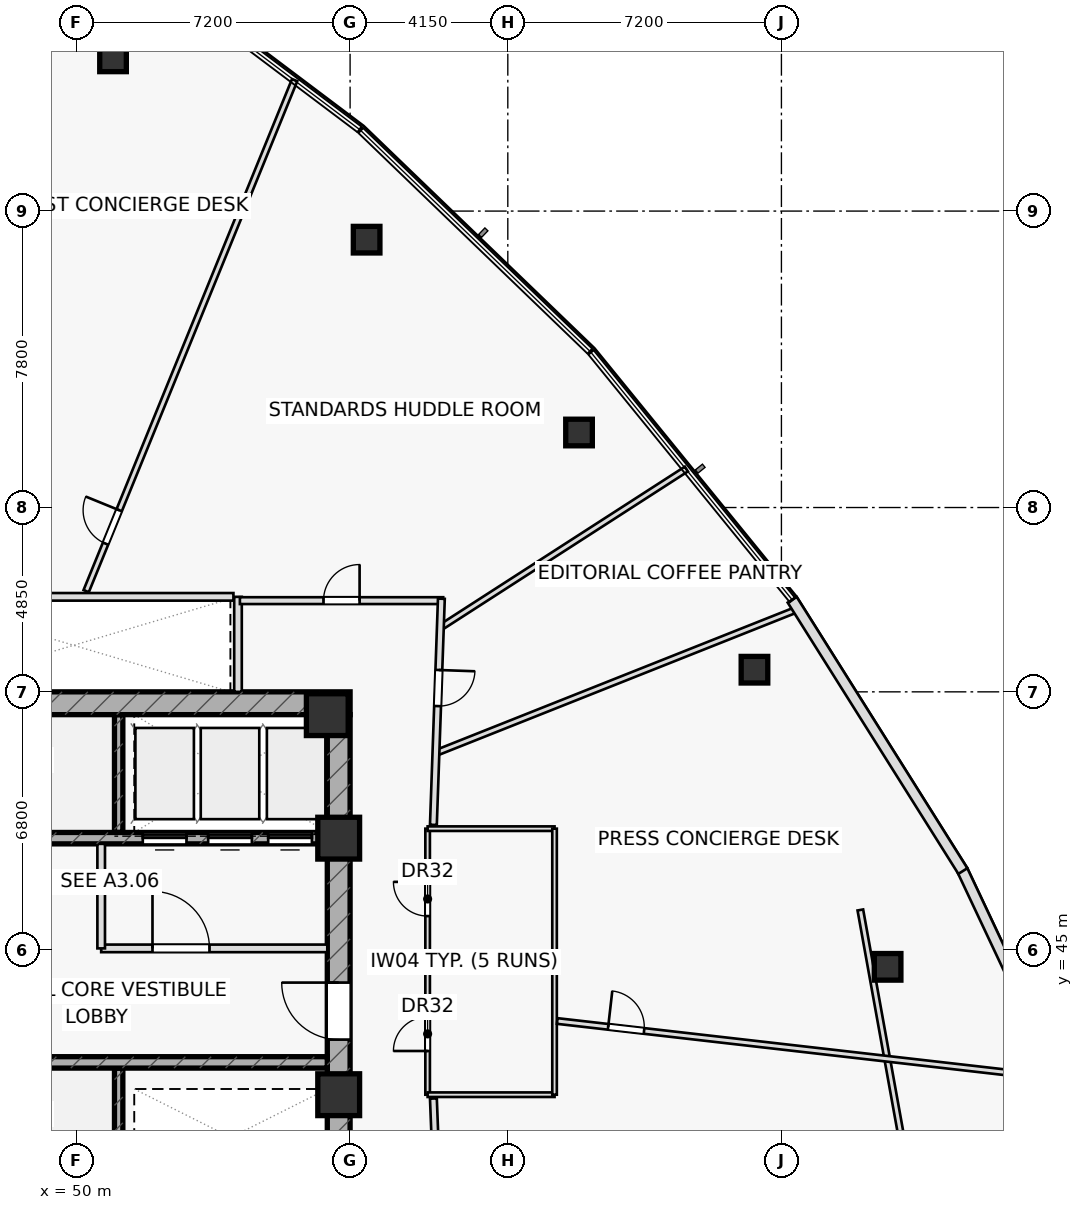
"""IFC4 building model, lengths in metres.
Left out: names, types, materials, properties, quantities, classifications, styles, units other than length and angle.
Written with IfcOpenShell. Run it as: python <this file> out.ifc"""

import sys

from ifc_helpers import new_model, si_unit, direction, frame, frame_2d, origin, origin_2d, place, context, subcontext, project, spatial, rectangle, hollow_rectangle, extrude, element, fill, save


model = new_model("IFC4")
c1 = context("Model", 3, precision=1e-05, world=origin(), true_north=direction((0.0, 1.0)))
c2 = subcontext(c1, "Body", "Model", "MODEL_VIEW")
j1 = project(units=[si_unit("LENGTHUNIT", "METRE"), si_unit("PLANEANGLEUNIT", "RADIAN")], contexts=[c1])
p1 = place(None, origin())
s1 = spatial("IfcSite", under=j1, at=p1, CompositionType="ELEMENT")
p2 = place(p1, origin())
s2 = spatial("IfcBuilding", under=s1, at=p2, CompositionType="ELEMENT")
p3 = place(p2, frame((0.0, 0.0, 78.3)))
s3 = spatial("IfcBuildingStorey", under=s2, at=p3, CompositionType="ELEMENT", Elevation=78.3)
for number, where, z_axis, x_axis in (
    (1, (51.11, 48.1, 0.0), (0.0, 0.0, 1.0), (0.0, 1.0, 0.0)),
    (2, (51.11, 38.8, 0.0), (0.0, 0.0, 1.0), (0.0, 1.0, 0.0)),
):
    element("IfcWall", number, at=place(p3, frame(where, z_axis=z_axis, x_axis=x_axis)), inside=s3, PredefinedType="SHEAR", context=c2, shape_type="SweptSolid", body=[
        extrude(rectangle(XDim=3.1, YDim=0.22, at=frame_2d((1.55, 0.0))), origin(), (0.0, 0.0, 1.0), 3.6),
    ])
p4 = place(p3, frame((42.8, 51.5, 0.0), z_axis=(0.0, 0.0, 1.0), x_axis=(1.0, 0.0, 0.0)))
e3 = element("IfcWall", 3, at=p4, inside=s3, PredefinedType="SHEAR", context=c2, shape_type="SweptSolid", body=[
    extrude(rectangle(XDim=14.4, YDim=0.6, at=frame_2d((7.2, 0.0))), origin(), (0.0, 0.0, 1.0), 3.6),
])
p5 = place(p4, frame((0.88, 0.0, 0.0)))
e4 = element("IfcOpeningElement", 4, at=p5, cuts=e3, PredefinedType="OPENING", context=c2, shape_type="SweptSolid", body=[
    extrude(rectangle(XDim=1.05, YDim=2.2, at=frame_2d((0.525, 1.1))), frame((0.0, 0.31, 0.0), z_axis=(0.0, -1.0, 0.0), x_axis=(1.0, 0.0, 0.0)), (0.0, 0.0, 1.0), 0.62),
])
p6 = place(p3, frame((56.9, 38.8, 0.0), z_axis=(0.0, 0.0, 1.0), x_axis=(0.0, 1.0, 0.0)))
e5 = element("IfcWall", 5, at=p6, inside=s3, PredefinedType="SHEAR", context=c2, shape_type="SweptSolid", body=[
    extrude(rectangle(XDim=12.4, YDim=0.6, at=frame_2d((6.2, 0.0))), origin(), (0.0, 0.0, 1.0), 3.6),
])
p7 = place(p6, frame((3.85, 0.0, 0.0)))
e6 = element("IfcOpeningElement", 6, at=p7, cuts=e5, PredefinedType="OPENING", context=c2, shape_type="SweptSolid", body=[
    extrude(rectangle(XDim=1.5, YDim=2.2, at=frame_2d((0.75, 1.1))), frame((0.0, 0.31, 0.0), z_axis=(0.0, -1.0, 0.0), x_axis=(1.0, 0.0, 0.0)), (0.0, 0.0, 1.0), 0.62),
])
p8 = place(p3, frame((43.4, 47.95, 0.0), z_axis=(0.0, 0.0, 1.0), x_axis=(1.0, 0.0, 0.0)))
e7 = element("IfcWall", 7, at=p8, inside=s3, PredefinedType="SHEAR", context=c2, shape_type="SweptSolid", body=[
    extrude(rectangle(XDim=13.2, YDim=0.3, at=frame_2d((6.6, 0.0))), origin(), (0.0, 0.0, 1.0), 3.6),
])
p9 = place(p8, frame((8.345, 0.0, 0.0)))
e8 = element("IfcOpeningElement", 8, at=p9, cuts=e7, PredefinedType="OPENING", context=c2, shape_type="SweptSolid", body=[
    extrude(rectangle(XDim=1.15, YDim=2.2, at=frame_2d((0.575, 1.1))), frame((0.0, 0.16, 0.0), z_axis=(0.0, -1.0, 0.0), x_axis=(1.0, 0.0, 0.0)), (0.0, 0.0, 1.0), 0.32),
])
p10 = place(p8, frame((10.065, 0.0, 0.0)))
e9 = element("IfcOpeningElement", 9, at=p10, cuts=e7, PredefinedType="OPENING", context=c2, shape_type="SweptSolid", body=[
    extrude(rectangle(XDim=1.15, YDim=2.2, at=frame_2d((0.575, 1.1))), frame((0.0, 0.16, 0.0), z_axis=(0.0, -1.0, 0.0), x_axis=(1.0, 0.0, 0.0)), (0.0, 0.0, 1.0), 0.32),
])
p11 = place(p8, frame((11.645, 0.0, 0.0)))
e10 = element("IfcOpeningElement", 10, at=p11, cuts=e7, PredefinedType="OPENING", context=c2, shape_type="SweptSolid", body=[
    extrude(rectangle(XDim=1.15, YDim=2.2, at=frame_2d((0.575, 1.1))), frame((0.0, 0.16, 0.0), z_axis=(0.0, -1.0, 0.0), x_axis=(1.0, 0.0, 0.0)), (0.0, 0.0, 1.0), 0.32),
])
p12 = place(p3, frame((43.4, 42.05, 0.0), z_axis=(0.0, 0.0, 1.0), x_axis=(1.0, 0.0, 0.0)))
e11 = element("IfcWall", 11, at=p12, inside=s3, PredefinedType="SHEAR", context=c2, shape_type="SweptSolid", body=[
    extrude(rectangle(XDim=13.2, YDim=0.3, at=frame_2d((6.6, 0.0))), origin(), (0.0, 0.0, 1.0), 3.6),
])
for number, where, z_axis, x_axis in (
    (12, (56.9, 47.95, 0.0), (0.0, 0.0, 1.0), (1.0, 0.0, 0.0)),
    (13, (56.6, 51.2, 0.0), (0.0, 0.0, 1.0), (1.0, 0.0, 0.0)),
    (14, (56.9, 41.2, 0.0), (0.0, 0.0, 1.0), (1.0, 0.0, 0.0)),
):
    element("IfcColumn", number, at=place(p3, frame(where, z_axis=z_axis, x_axis=x_axis)), inside=s3, PredefinedType="COLUMN", context=c2, shape_type="SweptSolid", body=[
        extrude(rectangle(XDim=1.1, YDim=1.1, at=origin_2d()), origin(), (0.0, 0.0, 1.0), 3.6),
    ])
for number, where, z_axis, x_axis in (
    (15, (71.344, 44.565, 0.0), (0.0, 0.0, 1.0), (1.0, 0.0, 0.0)),
    (16, (67.841, 52.383, 0.0), (0.0, 0.0, 1.0), (1.0, 0.0, 0.0)),
    (17, (63.224, 58.624, 0.0), (0.0, 0.0, 1.0), (1.0, 0.0, 0.0)),
    (18, (57.635, 63.698, 0.0), (0.0, 0.0, 1.0), (1.0, 0.0, 0.0)),
    (19, (50.962, 68.469, 0.0), (0.0, 0.0, 1.0), (1.0, 0.0, 0.0)),
):
    element("IfcColumn", number, at=place(p3, frame(where, z_axis=z_axis, x_axis=x_axis)), inside=s3, PredefinedType="COLUMN", context=c2, shape_type="SweptSolid", body=[
        extrude(hollow_rectangle(XDim=0.7, YDim=0.7, WallThickness=0.04, at=origin_2d()), origin(), (0.0, 0.0, 1.0), 3.6),
    ])
p13 = place(p3, frame((54.25, 51.8, 0.0), z_axis=(0.0, 0.0, 1.0), x_axis=(0.0, 1.0, 0.0)))
e20 = element("IfcWall", 20, at=p13, inside=s3, PredefinedType="PARTITIONING", context=c2, shape_type="SweptSolid", body=[
    extrude(rectangle(XDim=2.5, YDim=0.2, at=frame_2d((1.25, 0.0))), origin(), (0.0, 0.0, 1.0), 3.6),
])
p14 = place(p3, frame((50.65, 45.05, 0.0), z_axis=(0.0, 0.0, 1.0), x_axis=(1.0, 0.0, 0.0)))
e21 = element("IfcWall", 21, at=p14, inside=s3, PredefinedType="PARTITIONING", context=c2, shape_type="SweptSolid", body=[
    extrude(rectangle(XDim=5.95, YDim=0.2, at=frame_2d((2.975, 0.0))), origin(), (0.0, 0.0, 1.0), 3.6),
])
p15 = place(p14, frame((1.35, 0.0, 0.0)))
e22 = element("IfcOpeningElement", 22, at=p15, cuts=e21, PredefinedType="OPENING", context=c2, shape_type="SweptSolid", body=[
    extrude(rectangle(XDim=1.5, YDim=2.2, at=frame_2d((0.75, 1.1))), frame((0.0, 0.11, 0.0), z_axis=(0.0, -1.0, 0.0), x_axis=(1.0, 0.0, 0.0)), (0.0, 0.0, 1.0), 0.22),
])
p16 = place(p3, frame((50.65, 45.05, 0.0), z_axis=(0.0, 0.0, 1.0), x_axis=(0.0, 1.0, 0.0)))
e23 = element("IfcWall", 23, at=p16, inside=s3, PredefinedType="PARTITIONING", context=c2, shape_type="SweptSolid", body=[
    extrude(rectangle(XDim=2.75, YDim=0.2, at=frame_2d((1.375, 0.0))), origin(), (0.0, 0.0, 1.0), 3.6),
])
p17 = place(p3, frame((72.969, 33.091, 0.0), z_axis=(0.0, 0.0, 1.0), x_axis=(-0.177742578179, 0.984077017261, 0.0)))
e24 = element("IfcWall", 24, at=p17, inside=s3, PredefinedType="PARTITIONING", context=c2, shape_type="SweptSolid", body=[
    extrude(rectangle(XDim=13.179, YDim=0.15, at=frame_2d((6.59, 0.0))), origin(), (0.0, 0.0, 1.0), 2.975),
])
p18 = place(p3, frame((59.24, 41.2, 0.0), z_axis=(0.0, 0.0, 1.0), x_axis=(0.0, 1.0, 0.0)))
e25 = element("IfcWall", 25, at=p18, inside=s3, PredefinedType="PARTITIONING", context=c2, shape_type="SweptSolid", body=[
    extrude(rectangle(XDim=7.0, YDim=0.12, at=frame_2d((3.5, 0.0))), origin(), (0.0, 0.0, 1.0), 3.6),
])
p19 = place(p18, frame((1.15, 0.0, 0.0)))
e26 = element("IfcOpeningElement", 26, at=p19, cuts=e25, PredefinedType="OPENING", context=c2, shape_type="SweptSolid", body=[
    extrude(rectangle(XDim=0.9, YDim=2.05, at=frame_2d((0.45, 1.025))), frame((0.0, 0.07, 0.0), z_axis=(0.0, -1.0, 0.0), x_axis=(1.0, 0.0, 0.0)), (0.0, 0.0, 1.0), 0.14),
])
p20 = place(p18, frame((4.7, 0.0, 0.0)))
e27 = element("IfcOpeningElement", 27, at=p20, cuts=e25, PredefinedType="OPENING", context=c2, shape_type="SweptSolid", body=[
    extrude(rectangle(XDim=0.9, YDim=2.05, at=frame_2d((0.45, 1.025))), frame((0.0, 0.07, 0.0), z_axis=(0.0, -1.0, 0.0), x_axis=(1.0, 0.0, 0.0)), (0.0, 0.0, 1.0), 0.14),
])
p21 = place(p3, frame((59.24, 41.2, 0.0), z_axis=(0.0, 0.0, 1.0), x_axis=(1.0, 0.0, 0.0)))
e28 = element("IfcWall", 28, at=p21, inside=s3, PredefinedType="PARTITIONING", context=c2, shape_type="SweptSolid", body=[
    extrude(rectangle(XDim=3.34, YDim=0.12, at=frame_2d((1.67, 0.0))), origin(), (0.0, 0.0, 1.0), 2.975),
])
for number, where, z_axis, x_axis in (
    (29, (59.24, 44.65, 0.0), (0.0, 0.0, 1.0), (1.0, 0.0, 0.0)),
    (30, (59.24, 48.2, 0.0), (0.0, 0.0, 1.0), (1.0, 0.0, 0.0)),
):
    element("IfcWall", number, at=place(p3, frame(where, z_axis=z_axis, x_axis=x_axis)), inside=s3, PredefinedType="PARTITIONING", context=c2, shape_type="SweptSolid", body=[
        extrude(rectangle(XDim=3.34, YDim=0.12, at=frame_2d((1.67, 0.0))), origin(), (0.0, 0.0, 1.0), 3.6),
    ])
p22 = place(p3, frame((62.58, 41.2, 0.0), z_axis=(0.0, 0.0, 1.0), x_axis=(0.0, 1.0, 0.0)))
e31 = element("IfcWall", 31, at=p22, inside=s3, PredefinedType="PARTITIONING", context=c2, shape_type="SweptSolid", body=[
    extrude(rectangle(XDim=7.0, YDim=0.12, at=frame_2d((3.5, 0.0))), origin(), (0.0, 0.0, 1.0), 3.6),
])
p23 = place(p3, frame((62.65, 43.139, 0.0), z_axis=(0.0, 0.0, 1.0), x_axis=(0.993507762736, -0.113764341437, 0.0)))
e32 = element("IfcWall", 32, at=p23, inside=s3, PredefinedType="PARTITIONING", context=c2, shape_type="SweptSolid", body=[
    extrude(rectangle(XDim=13.344, YDim=0.15, at=frame_2d((6.672, 0.0))), origin(), (0.0, 0.0, 1.0), 2.975),
])
p24 = place(p23, frame((1.35, 0.0, 0.0)))
e33 = element("IfcOpeningElement", 33, at=p24, cuts=e32, PredefinedType="OPENING", context=c2, shape_type="SweptSolid", body=[
    extrude(rectangle(XDim=0.95, YDim=2.05, at=frame_2d((0.475, 1.025))), frame((0.0, 0.085, 0.0), z_axis=(0.0, -1.0, 0.0), x_axis=(1.0, 0.0, 0.0)), (0.0, 0.0, 1.0), 0.17),
])
p25 = place(p3, frame((59.458, 50.191, 0.0), z_axis=(0.0, 0.0, 1.0), x_axis=(0.929263627869, 0.369417257204, 0.0)))
e34 = element("IfcWall", 34, at=p25, inside=s3, PredefinedType="PARTITIONING", context=c2, shape_type="SweptSolid", body=[
    extrude(rectangle(XDim=10.264, YDim=0.15, at=frame_2d((5.132, 0.0))), origin(), (0.0, 0.0, 1.0), 2.975),
])
p26 = place(p3, frame((59.575, 53.49, 0.0), z_axis=(0.0, 0.0, 1.0), x_axis=(0.840572318157, 0.541699342762, 0.0)))
e35 = element("IfcWall", 35, at=p26, inside=s3, PredefinedType="PARTITIONING", context=c2, shape_type="SweptSolid", body=[
    extrude(rectangle(XDim=7.701, YDim=0.15, at=frame_2d((3.851, 0.0))), origin(), (0.0, 0.0, 1.0), 3.025),
])
p27 = place(p3, frame((50.255, 54.45, 0.0), z_axis=(0.0, 0.0, 1.0), x_axis=(0.377744353623, 0.92590993261, 0.0)))
e36 = element("IfcWall", 36, at=p27, inside=s3, PredefinedType="PARTITIONING", context=c2, shape_type="SweptSolid", body=[
    extrude(rectangle(XDim=14.522, YDim=0.15, at=frame_2d((7.261, 0.0))), origin(), (0.0, 0.0, 1.0), 2.975),
])
p28 = place(p27, frame((1.35, 0.0, 0.0)))
e37 = element("IfcOpeningElement", 37, at=p28, cuts=e36, PredefinedType="OPENING", context=c2, shape_type="SweptSolid", body=[
    extrude(rectangle(XDim=0.95, YDim=2.05, at=frame_2d((0.475, 1.025))), frame((0.0, 0.085, 0.0), z_axis=(0.0, -1.0, 0.0), x_axis=(1.0, 0.0, 0.0)), (0.0, 0.0, 1.0), 0.17),
])
p29 = place(p3, frame((54.3, 54.2, 0.0), z_axis=(0.0, 0.0, 1.0), x_axis=(1.0, 0.0, 0.0)))
e38 = element("IfcWall", 38, at=p29, inside=s3, PredefinedType="PARTITIONING", context=c2, shape_type="SweptSolid", body=[
    extrude(rectangle(XDim=5.35, YDim=0.18, at=frame_2d((2.675, 0.0))), origin(), (0.0, 0.0, 1.0), 2.975),
])
p30 = place(p29, frame((2.2, 0.0, 0.0)))
e39 = element("IfcOpeningElement", 39, at=p30, cuts=e38, PredefinedType="OPENING", context=c2, shape_type="SweptSolid", body=[
    extrude(rectangle(XDim=0.95, YDim=2.05, at=frame_2d((0.475, 1.025))), frame((0.0, 0.1, 0.0), z_axis=(0.0, -1.0, 0.0), x_axis=(1.0, 0.0, 0.0)), (0.0, 0.0, 1.0), 0.2),
])
p31 = place(p3, frame((59.602, 54.25, 0.0), z_axis=(0.0, 0.0, 1.0), x_axis=(-0.035265891834, -0.999377964973, 0.0)))
e40 = element("IfcWall", 40, at=p31, inside=s3, PredefinedType="PARTITIONING", context=c2, shape_type="SweptSolid", body=[
    extrude(rectangle(XDim=5.954, YDim=0.18, at=frame_2d((2.977, 0.0))), origin(), (0.0, 0.0, 1.0), 2.975),
])
p32 = place(p31, frame((1.876, 0.0, 0.0)))
e41 = element("IfcOpeningElement", 41, at=p32, cuts=e40, PredefinedType="OPENING", context=c2, shape_type="SweptSolid", body=[
    extrude(rectangle(XDim=0.95, YDim=2.05, at=frame_2d((0.475, 1.025))), frame((0.0, 0.1, 0.0), z_axis=(0.0, -1.0, 0.0), x_axis=(1.0, 0.0, 0.0)), (0.0, 0.0, 1.0), 0.2),
])
p33 = place(p3, frame((59.392, 41.1, 0.0), z_axis=(0.0, 0.0, 1.0), x_axis=(0.03921413315, -0.999230830069, 0.0)))
e42 = element("IfcWall", 42, at=p33, inside=s3, PredefinedType="PARTITIONING", context=c2, shape_type="SweptSolid", body=[
    extrude(rectangle(XDim=5.354, YDim=0.18, at=frame_2d((2.677, 0.0))), origin(), (0.0, 0.0, 1.0), 2.975),
])
p34 = place(p33, frame((2.202, 0.0, 0.0)))
e43 = element("IfcOpeningElement", 43, at=p34, cuts=e42, PredefinedType="OPENING", context=c2, shape_type="SweptSolid", body=[
    extrude(rectangle(XDim=0.95, YDim=2.05, at=frame_2d((0.475, 1.025))), frame((0.0, 0.1, 0.0), z_axis=(0.0, -1.0, 0.0), x_axis=(1.0, 0.0, 0.0)), (0.0, 0.0, 1.0), 0.2),
])
p35 = place(p3, frame((76.909, 39.471, 0.0), z_axis=(0.0, 0.0, 1.0), x_axis=(-0.426150605753, 0.904652232196, 0.0)))
e44 = element("IfcWall", 44, at=p35, inside=s3, PredefinedType="STANDARD", context=c2, shape_type="SweptSolid", body=[
    extrude(rectangle(XDim=8.446, YDim=0.28, at=frame_2d((4.223, 0.0))), origin(), (0.0, 0.0, 1.0), 3.6),
])
p36 = place(p3, frame((73.324, 47.085, 0.0), z_axis=(0.0, 0.0, 1.0), x_axis=(-0.53250765481, 0.846425187225, 0.0)))
e45 = element("IfcWall", 45, at=p36, inside=s3, PredefinedType="STANDARD", context=c2, shape_type="SweptSolid", body=[
    extrude(rectangle(XDim=8.434, YDim=0.28, at=frame_2d((4.217, 0.0))), origin(), (0.0, 0.0, 1.0), 3.6),
])
p37 = place(p3, frame((45.82, 54.3, 0.0), z_axis=(0.0, 0.0, 1.0), x_axis=(1.0, 0.0, 0.0)))
e46 = element("IfcWall", 46, at=p37, inside=s3, PredefinedType="PARTITIONING", context=c2, shape_type="SweptSolid", body=[
    extrude(rectangle(XDim=8.31, YDim=0.2, at=frame_2d((4.155, 0.0))), origin(), (0.0, 0.0, 1.0), 3.6),
])
p38 = place(p7, origin())
e47 = element("IfcDoor", 47, at=p38, inside=s3, OperationType="SINGLE_SWING_RIGHT", PredefinedType="DOOR", context=c2, shape_type="SweptSolid", body=[
    extrude(rectangle(XDim=1.5, YDim=2.2, at=frame_2d((0.75, 1.1))), frame((0.0, 0.025, 0.0), z_axis=(0.0, -1.0, 0.0), x_axis=(1.0, 0.0, 0.0)), (0.0, 0.0, 1.0), 0.05),
])
fill(e6, e47)
p39 = place(p15, origin())
e48 = element("IfcDoor", 48, at=p39, inside=s3, OperationType="SINGLE_SWING_LEFT", PredefinedType="DOOR", context=c2, shape_type="SweptSolid", body=[
    extrude(rectangle(XDim=1.5, YDim=2.2, at=frame_2d((0.75, 1.1))), frame((0.0, 0.025, 0.0), z_axis=(0.0, -1.0, 0.0), x_axis=(1.0, 0.0, 0.0)), (0.0, 0.0, 1.0), 0.05),
])
fill(e22, e48)
p40 = place(p19, origin())
e49 = element("IfcDoor", 49, at=p40, inside=s3, OperationType="SINGLE_SWING_LEFT", PredefinedType="DOOR", context=c2, shape_type="SweptSolid", body=[
    extrude(rectangle(XDim=0.9, YDim=2.05, at=frame_2d((0.45, 1.025))), frame((0.0, 0.025, 0.0), z_axis=(0.0, -1.0, 0.0), x_axis=(1.0, 0.0, 0.0)), (0.0, 0.0, 1.0), 0.05),
])
fill(e26, e49)
p41 = place(p20, origin())
e50 = element("IfcDoor", 50, at=p41, inside=s3, OperationType="SINGLE_SWING_RIGHT", PredefinedType="DOOR", context=c2, shape_type="SweptSolid", body=[
    extrude(rectangle(XDim=0.9, YDim=2.05, at=frame_2d((0.45, 1.025))), frame((0.0, 0.025, 0.0), z_axis=(0.0, -1.0, 0.0), x_axis=(1.0, 0.0, 0.0)), (0.0, 0.0, 1.0), 0.05),
])
fill(e27, e50)
p42 = place(p24, origin())
e51 = element("IfcDoor", 51, at=p42, inside=s3, OperationType="SINGLE_SWING_LEFT", PredefinedType="DOOR", context=c2, shape_type="SweptSolid", body=[
    extrude(rectangle(XDim=0.95, YDim=2.05, at=frame_2d((0.475, 1.025))), frame((0.0, 0.025, 0.0), z_axis=(0.0, -1.0, 0.0), x_axis=(1.0, 0.0, 0.0)), (0.0, 0.0, 1.0), 0.05),
])
fill(e33, e51)
p43 = place(p28, origin())
e52 = element("IfcDoor", 52, at=p43, inside=s3, OperationType="SINGLE_SWING_RIGHT", PredefinedType="DOOR", context=c2, shape_type="SweptSolid", body=[
    extrude(rectangle(XDim=0.95, YDim=2.05, at=frame_2d((0.475, 1.025))), frame((0.0, 0.025, 0.0), z_axis=(0.0, -1.0, 0.0), x_axis=(1.0, 0.0, 0.0)), (0.0, 0.0, 1.0), 0.05),
])
fill(e37, e52)
p44 = place(p30, origin())
e53 = element("IfcDoor", 53, at=p44, inside=s3, OperationType="SINGLE_SWING_RIGHT", PredefinedType="DOOR", context=c2, shape_type="SweptSolid", body=[
    extrude(rectangle(XDim=0.95, YDim=2.05, at=frame_2d((0.475, 1.025))), frame((0.0, 0.025, 0.0), z_axis=(0.0, -1.0, 0.0), x_axis=(1.0, 0.0, 0.0)), (0.0, 0.0, 1.0), 0.05),
])
fill(e39, e53)
p45 = place(p32, origin())
e54 = element("IfcDoor", 54, at=p45, inside=s3, OperationType="SINGLE_SWING_LEFT", PredefinedType="DOOR", context=c2, shape_type="SweptSolid", body=[
    extrude(rectangle(XDim=0.95, YDim=2.05, at=frame_2d((0.475, 1.025))), frame((0.0, 0.025, 0.0), z_axis=(0.0, -1.0, 0.0), x_axis=(1.0, 0.0, 0.0)), (0.0, 0.0, 1.0), 0.05),
])
fill(e41, e54)
p46 = place(p9, origin())
e55 = element("IfcDoor", 55, at=p46, inside=s3, OperationType="SLIDING_TO_LEFT", PredefinedType="DOOR", context=c2, shape_type="SweptSolid", body=[
    extrude(rectangle(XDim=1.15, YDim=2.2, at=frame_2d((0.575, 1.1))), frame((0.0, 0.025, 0.0), z_axis=(0.0, -1.0, 0.0), x_axis=(1.0, 0.0, 0.0)), (0.0, 0.0, 1.0), 0.05),
])
fill(e8, e55)
p47 = place(p10, origin())
e56 = element("IfcDoor", 56, at=p47, inside=s3, OperationType="SLIDING_TO_LEFT", PredefinedType="DOOR", context=c2, shape_type="SweptSolid", body=[
    extrude(rectangle(XDim=1.15, YDim=2.2, at=frame_2d((0.575, 1.1))), frame((0.0, 0.025, 0.0), z_axis=(0.0, -1.0, 0.0), x_axis=(1.0, 0.0, 0.0)), (0.0, 0.0, 1.0), 0.05),
])
fill(e9, e56)
p48 = place(p11, origin())
e57 = element("IfcDoor", 57, at=p48, inside=s3, OperationType="SLIDING_TO_LEFT", PredefinedType="DOOR", context=c2, shape_type="SweptSolid", body=[
    extrude(rectangle(XDim=1.15, YDim=2.2, at=frame_2d((0.575, 1.1))), frame((0.0, 0.025, 0.0), z_axis=(0.0, -1.0, 0.0), x_axis=(1.0, 0.0, 0.0)), (0.0, 0.0, 1.0), 0.05),
])
fill(e10, e57)
save(model, sys.argv[1])
